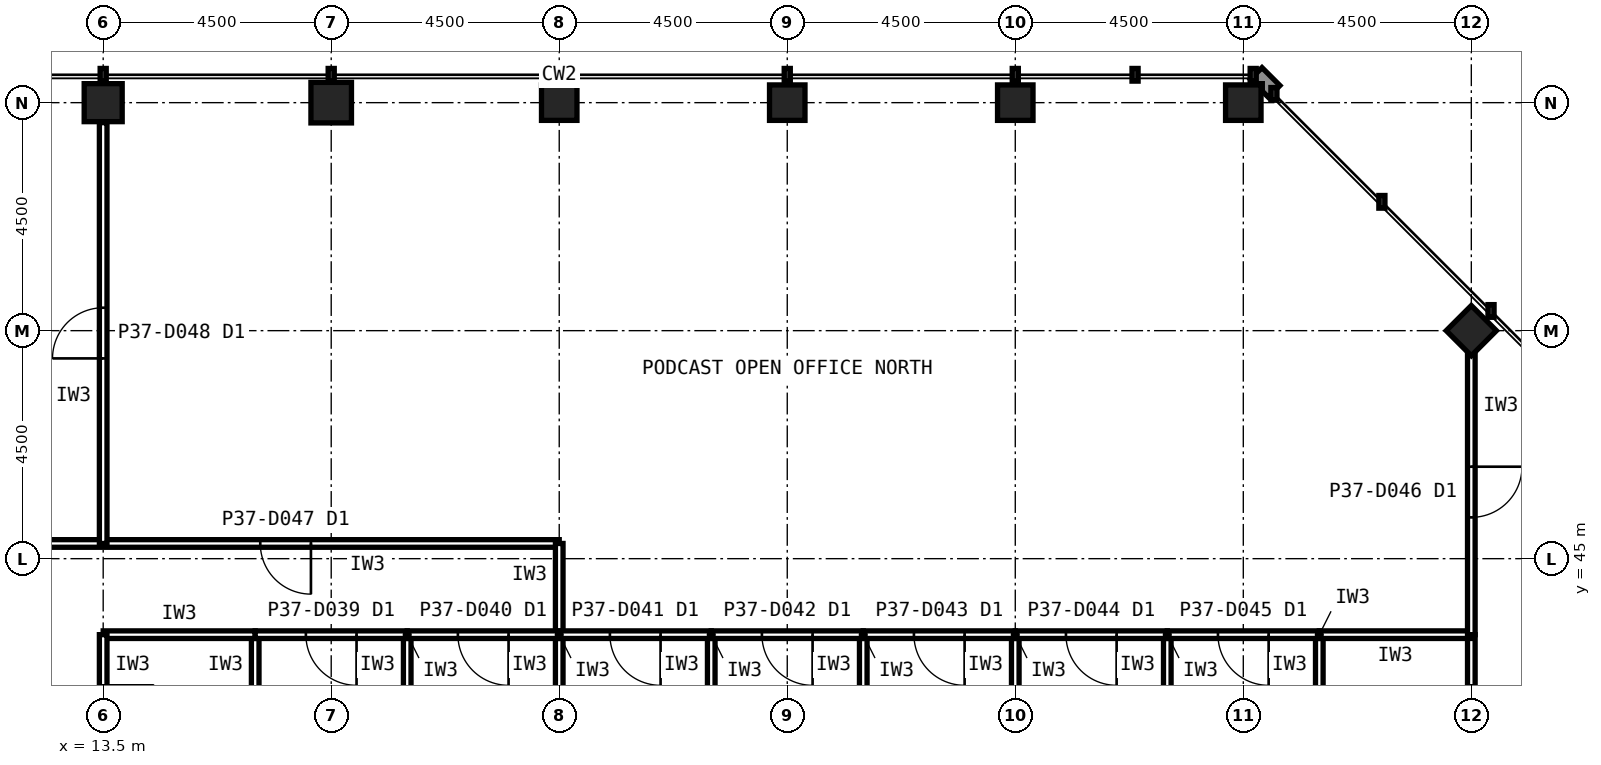
"""IFC4 building model, lengths in metres.
Left out: names, types, materials, properties, quantities, classifications, styles, units other than length and angle.
Written with IfcOpenShell. Run it as: python <this file> out.ifc"""

import sys

from ifc_helpers import new_model, si_unit, direction, frame, frame_2d, origin, origin_2d, place, context, subcontext, project, spatial, rectangle, hollow_rectangle, extrude, element, fill, save


model = new_model("IFC4")
c1 = context("Model", 3, precision=1e-05, world=origin(), true_north=direction((0.0, 1.0)))
c2 = subcontext(c1, "Body", "Model", "MODEL_VIEW")
j1 = project(units=[si_unit("LENGTHUNIT", "METRE"), si_unit("PLANEANGLEUNIT", "RADIAN")], contexts=[c1])
p1 = place(None, origin())
s1 = spatial("IfcSite", under=j1, at=p1, CompositionType="ELEMENT")
p2 = place(p1, origin())
s2 = spatial("IfcBuilding", under=s1, at=p2, CompositionType="ELEMENT")
p3 = place(p2, frame((0.0, 0.0, 159.6)))
s3 = spatial("IfcBuildingStorey", under=s2, at=p3, CompositionType="ELEMENT", Elevation=159.6)
for number, where, z_axis, x_axis in (
    (1, (36.0, 54.0, 0.0), (0.0, 0.0, 1.0), (1.0, 0.0, 0.0)),
    (2, (31.5, 54.0, 0.0), (0.0, 0.0, 1.0), (1.0, 0.0, 0.0)),
    (3, (27.0, 54.0, 0.0), (0.0, 0.0, 1.0), (1.0, 0.0, 0.0)),
    (4, (22.5, 54.0, 0.0), (0.0, 0.0, 1.0), (1.0, 0.0, 0.0)),
):
    element("IfcColumn", number, at=place(p3, frame(where, z_axis=z_axis, x_axis=x_axis)), inside=s3, PredefinedType="COLUMN", context=c2, shape_type="SweptSolid", body=[
        extrude(hollow_rectangle(XDim=0.7, YDim=0.7, WallThickness=0.036, at=origin_2d()), origin(), (0.0, 0.0, 1.0), 4.0),
    ])
p4 = place(p3, frame((18.0, 54.0, 0.0), z_axis=(0.0, 0.0, 1.0), x_axis=(1.0, 0.0, 0.0)))
e5 = element("IfcColumn", 5, at=p4, inside=s3, PredefinedType="COLUMN", context=c2, shape_type="SweptSolid", body=[
    extrude(hollow_rectangle(XDim=0.8, YDim=0.8, WallThickness=0.045, at=origin_2d()), origin(), (0.0, 0.0, 1.0), 4.0),
])
p5 = place(p3, frame((13.5, 54.0, 0.0), z_axis=(0.0, 0.0, 1.0), x_axis=(1.0, 0.0, 0.0)))
e6 = element("IfcColumn", 6, at=p5, inside=s3, PredefinedType="COLUMN", context=c2, shape_type="SweptSolid", body=[
    extrude(hollow_rectangle(XDim=0.75, YDim=0.75, WallThickness=0.04, at=origin_2d()), origin(), (0.0, 0.0, 1.0), 4.0),
])
p6 = place(p3, frame((40.5, 49.5, 0.0), z_axis=(0.0, 0.0, 1.0), x_axis=(0.707106781187, 0.707106781187, 0.0)))
e7 = element("IfcColumn", 7, at=p6, inside=s3, PredefinedType="COLUMN", context=c2, shape_type="SweptSolid", body=[
    extrude(hollow_rectangle(XDim=0.7, YDim=0.7, WallThickness=0.036, at=origin_2d()), origin(), (0.0, 0.0, 1.0), 4.0),
])
p7 = place(p3, frame((22.5, 45.3, 0.0), z_axis=(0.0, 0.0, 1.0), x_axis=(-1.0, 0.0, 0.0)))
e8 = element("IfcWall", 8, at=p7, inside=s3, PredefinedType="PARTITIONING", context=c2, shape_type="SweptSolid", body=[
    extrude(rectangle(XDim=10.8, YDim=0.15, at=frame_2d((5.4, 0.0))), origin(), (0.0, 0.0, 1.0), 3.84),
])
p8 = place(p7, frame((4.9, 0.0, 0.0)))
e9 = element("IfcOpeningElement", 9, at=p8, cuts=e8, PredefinedType="OPENING", context=c2, shape_type="SweptSolid", body=[
    extrude(rectangle(XDim=1.0, YDim=2.1, at=frame_2d((0.5, 1.05))), frame((0.0, 0.085, 0.0), z_axis=(0.0, -1.0, 0.0), x_axis=(1.0, 0.0, 0.0)), (0.0, 0.0, 1.0), 0.17),
])
p9 = place(p3, frame((22.5, 43.5, 0.0), z_axis=(0.0, 0.0, 1.0), x_axis=(0.0, 1.0, 0.0)))
e10 = element("IfcWall", 10, at=p9, inside=s3, PredefinedType="PARTITIONING", context=c2, shape_type="SweptSolid", body=[
    extrude(rectangle(XDim=1.8, YDim=0.15, at=frame_2d((0.9, 0.0))), origin(), (0.0, 0.0, 1.0), 2.989),
])
for number, where, z_axis, x_axis in (
    (11, (16.5, 40.5, 0.0), (0.0, 0.0, 1.0), (0.0, 1.0, 0.0)),
    (12, (16.5, 43.5, 0.0), (0.0, 0.0, 1.0), (-1.0, 0.0, 0.0)),
):
    element("IfcWall", number, at=place(p3, frame(where, z_axis=z_axis, x_axis=x_axis)), inside=s3, PredefinedType="PARTITIONING", context=c2, shape_type="SweptSolid", body=[
        extrude(rectangle(XDim=3.0, YDim=0.15, at=frame_2d((1.5, 0.0))), origin(), (0.0, 0.0, 1.0), 3.84),
    ])
p10 = place(p3, frame((13.5, 43.5, 0.0), z_axis=(0.0, 0.0, 1.0), x_axis=(0.0, -1.0, 0.0)))
e13 = element("IfcWall", 13, at=p10, inside=s3, PredefinedType="PARTITIONING", context=c2, shape_type="SweptSolid", body=[
    extrude(rectangle(XDim=3.0, YDim=0.15, at=frame_2d((1.5, 0.0))), origin(), (0.0, 0.0, 1.0), 2.989),
])
p11 = place(p10, frame((1.0, 0.0, 0.0)))
e14 = element("IfcOpeningElement", 14, at=p11, cuts=e13, PredefinedType="OPENING", context=c2, shape_type="SweptSolid", body=[
    extrude(rectangle(XDim=1.0, YDim=2.1, at=frame_2d((0.5, 1.05))), frame((0.0, 0.085, 0.0), z_axis=(0.0, -1.0, 0.0), x_axis=(1.0, 0.0, 0.0)), (0.0, 0.0, 1.0), 0.17),
])
p12 = place(p3, frame((19.5, 40.5, 0.0), z_axis=(0.0, 0.0, 1.0), x_axis=(0.0, 1.0, 0.0)))
e15 = element("IfcWall", 15, at=p12, inside=s3, PredefinedType="PARTITIONING", context=c2, shape_type="SweptSolid", body=[
    extrude(rectangle(XDim=3.0, YDim=0.15, at=frame_2d((1.5, 0.0))), origin(), (0.0, 0.0, 1.0), 3.84),
])
p13 = place(p3, frame((19.5, 43.5, 0.0), z_axis=(0.0, 0.0, 1.0), x_axis=(-1.0, 0.0, 0.0)))
e16 = element("IfcWall", 16, at=p13, inside=s3, PredefinedType="PARTITIONING", context=c2, shape_type="SweptSolid", body=[
    extrude(rectangle(XDim=3.0, YDim=0.15, at=frame_2d((1.5, 0.0))), origin(), (0.0, 0.0, 1.0), 3.84),
])
p14 = place(p13, frame((1.0, 0.0, 0.0)))
e17 = element("IfcOpeningElement", 17, at=p14, cuts=e16, PredefinedType="OPENING", context=c2, shape_type="SweptSolid", body=[
    extrude(rectangle(XDim=1.0, YDim=2.1, at=frame_2d((0.5, 1.05))), frame((0.0, 0.085, 0.0), z_axis=(0.0, -1.0, 0.0), x_axis=(1.0, 0.0, 0.0)), (0.0, 0.0, 1.0), 0.17),
])
p15 = place(p3, frame((22.5, 40.5, 0.0), z_axis=(0.0, 0.0, 1.0), x_axis=(0.0, 1.0, 0.0)))
e18 = element("IfcWall", 18, at=p15, inside=s3, PredefinedType="PARTITIONING", context=c2, shape_type="SweptSolid", body=[
    extrude(rectangle(XDim=3.0, YDim=0.15, at=frame_2d((1.5, 0.0))), origin(), (0.0, 0.0, 1.0), 2.989),
])
p16 = place(p3, frame((22.5, 43.5, 0.0), z_axis=(0.0, 0.0, 1.0), x_axis=(-1.0, 0.0, 0.0)))
e19 = element("IfcWall", 19, at=p16, inside=s3, PredefinedType="PARTITIONING", context=c2, shape_type="SweptSolid", body=[
    extrude(rectangle(XDim=3.0, YDim=0.15, at=frame_2d((1.5, 0.0))), origin(), (0.0, 0.0, 1.0), 3.84),
])
p17 = place(p16, frame((1.0, 0.0, 0.0)))
e20 = element("IfcOpeningElement", 20, at=p17, cuts=e19, PredefinedType="OPENING", context=c2, shape_type="SweptSolid", body=[
    extrude(rectangle(XDim=1.0, YDim=2.1, at=frame_2d((0.5, 1.05))), frame((0.0, 0.085, 0.0), z_axis=(0.0, -1.0, 0.0), x_axis=(1.0, 0.0, 0.0)), (0.0, 0.0, 1.0), 0.17),
])
p18 = place(p3, frame((25.5, 40.5, 0.0), z_axis=(0.0, 0.0, 1.0), x_axis=(0.0, 1.0, 0.0)))
e21 = element("IfcWall", 21, at=p18, inside=s3, PredefinedType="PARTITIONING", context=c2, shape_type="SweptSolid", body=[
    extrude(rectangle(XDim=3.0, YDim=0.15, at=frame_2d((1.5, 0.0))), origin(), (0.0, 0.0, 1.0), 3.84),
])
p19 = place(p3, frame((25.5, 43.5, 0.0), z_axis=(0.0, 0.0, 1.0), x_axis=(-1.0, 0.0, 0.0)))
e22 = element("IfcWall", 22, at=p19, inside=s3, PredefinedType="PARTITIONING", context=c2, shape_type="SweptSolid", body=[
    extrude(rectangle(XDim=3.0, YDim=0.15, at=frame_2d((1.5, 0.0))), origin(), (0.0, 0.0, 1.0), 3.84),
])
p20 = place(p19, frame((1.0, 0.0, 0.0)))
e23 = element("IfcOpeningElement", 23, at=p20, cuts=e22, PredefinedType="OPENING", context=c2, shape_type="SweptSolid", body=[
    extrude(rectangle(XDim=1.0, YDim=2.1, at=frame_2d((0.5, 1.05))), frame((0.0, 0.085, 0.0), z_axis=(0.0, -1.0, 0.0), x_axis=(1.0, 0.0, 0.0)), (0.0, 0.0, 1.0), 0.17),
])
p21 = place(p3, frame((28.5, 40.5, 0.0), z_axis=(0.0, 0.0, 1.0), x_axis=(0.0, 1.0, 0.0)))
e24 = element("IfcWall", 24, at=p21, inside=s3, PredefinedType="PARTITIONING", context=c2, shape_type="SweptSolid", body=[
    extrude(rectangle(XDim=3.0, YDim=0.15, at=frame_2d((1.5, 0.0))), origin(), (0.0, 0.0, 1.0), 3.84),
])
p22 = place(p3, frame((28.5, 43.5, 0.0), z_axis=(0.0, 0.0, 1.0), x_axis=(-1.0, 0.0, 0.0)))
e25 = element("IfcWall", 25, at=p22, inside=s3, PredefinedType="PARTITIONING", context=c2, shape_type="SweptSolid", body=[
    extrude(rectangle(XDim=3.0, YDim=0.15, at=frame_2d((1.5, 0.0))), origin(), (0.0, 0.0, 1.0), 3.84),
])
p23 = place(p22, frame((1.0, 0.0, 0.0)))
e26 = element("IfcOpeningElement", 26, at=p23, cuts=e25, PredefinedType="OPENING", context=c2, shape_type="SweptSolid", body=[
    extrude(rectangle(XDim=1.0, YDim=2.1, at=frame_2d((0.5, 1.05))), frame((0.0, 0.085, 0.0), z_axis=(0.0, -1.0, 0.0), x_axis=(1.0, 0.0, 0.0)), (0.0, 0.0, 1.0), 0.17),
])
p24 = place(p3, frame((31.5, 40.5, 0.0), z_axis=(0.0, 0.0, 1.0), x_axis=(0.0, 1.0, 0.0)))
e27 = element("IfcWall", 27, at=p24, inside=s3, PredefinedType="PARTITIONING", context=c2, shape_type="SweptSolid", body=[
    extrude(rectangle(XDim=3.0, YDim=0.15, at=frame_2d((1.5, 0.0))), origin(), (0.0, 0.0, 1.0), 2.989),
])
p25 = place(p3, frame((31.5, 43.5, 0.0), z_axis=(0.0, 0.0, 1.0), x_axis=(-1.0, 0.0, 0.0)))
e28 = element("IfcWall", 28, at=p25, inside=s3, PredefinedType="PARTITIONING", context=c2, shape_type="SweptSolid", body=[
    extrude(rectangle(XDim=3.0, YDim=0.15, at=frame_2d((1.5, 0.0))), origin(), (0.0, 0.0, 1.0), 3.84),
])
p26 = place(p25, frame((1.0, 0.0, 0.0)))
e29 = element("IfcOpeningElement", 29, at=p26, cuts=e28, PredefinedType="OPENING", context=c2, shape_type="SweptSolid", body=[
    extrude(rectangle(XDim=1.0, YDim=2.1, at=frame_2d((0.5, 1.05))), frame((0.0, 0.085, 0.0), z_axis=(0.0, -1.0, 0.0), x_axis=(1.0, 0.0, 0.0)), (0.0, 0.0, 1.0), 0.17),
])
p27 = place(p3, frame((34.5, 40.5, 0.0), z_axis=(0.0, 0.0, 1.0), x_axis=(0.0, 1.0, 0.0)))
e30 = element("IfcWall", 30, at=p27, inside=s3, PredefinedType="PARTITIONING", context=c2, shape_type="SweptSolid", body=[
    extrude(rectangle(XDim=3.0, YDim=0.15, at=frame_2d((1.5, 0.0))), origin(), (0.0, 0.0, 1.0), 3.84),
])
p28 = place(p3, frame((34.5, 43.5, 0.0), z_axis=(0.0, 0.0, 1.0), x_axis=(-1.0, 0.0, 0.0)))
e31 = element("IfcWall", 31, at=p28, inside=s3, PredefinedType="PARTITIONING", context=c2, shape_type="SweptSolid", body=[
    extrude(rectangle(XDim=3.0, YDim=0.15, at=frame_2d((1.5, 0.0))), origin(), (0.0, 0.0, 1.0), 3.84),
])
p29 = place(p28, frame((1.0, 0.0, 0.0)))
e32 = element("IfcOpeningElement", 32, at=p29, cuts=e31, PredefinedType="OPENING", context=c2, shape_type="SweptSolid", body=[
    extrude(rectangle(XDim=1.0, YDim=2.1, at=frame_2d((0.5, 1.05))), frame((0.0, 0.085, 0.0), z_axis=(0.0, -1.0, 0.0), x_axis=(1.0, 0.0, 0.0)), (0.0, 0.0, 1.0), 0.17),
])
p30 = place(p3, frame((37.5, 40.5, 0.0), z_axis=(0.0, 0.0, 1.0), x_axis=(0.0, 1.0, 0.0)))
e33 = element("IfcWall", 33, at=p30, inside=s3, PredefinedType="PARTITIONING", context=c2, shape_type="SweptSolid", body=[
    extrude(rectangle(XDim=3.0, YDim=0.15, at=frame_2d((1.5, 0.0))), origin(), (0.0, 0.0, 1.0), 3.84),
])
p31 = place(p3, frame((37.5, 43.5, 0.0), z_axis=(0.0, 0.0, 1.0), x_axis=(-1.0, 0.0, 0.0)))
e34 = element("IfcWall", 34, at=p31, inside=s3, PredefinedType="PARTITIONING", context=c2, shape_type="SweptSolid", body=[
    extrude(rectangle(XDim=3.0, YDim=0.15, at=frame_2d((1.5, 0.0))), origin(), (0.0, 0.0, 1.0), 3.84),
])
p32 = place(p31, frame((1.0, 0.0, 0.0)))
e35 = element("IfcOpeningElement", 35, at=p32, cuts=e34, PredefinedType="OPENING", context=c2, shape_type="SweptSolid", body=[
    extrude(rectangle(XDim=1.0, YDim=2.1, at=frame_2d((0.5, 1.05))), frame((0.0, 0.085, 0.0), z_axis=(0.0, -1.0, 0.0), x_axis=(1.0, 0.0, 0.0)), (0.0, 0.0, 1.0), 0.17),
])
p33 = place(p3, frame((40.5, 40.5, 0.0), z_axis=(0.0, 0.0, 1.0), x_axis=(0.0, 1.0, 0.0)))
e36 = element("IfcWall", 36, at=p33, inside=s3, PredefinedType="PARTITIONING", context=c2, shape_type="SweptSolid", body=[
    extrude(rectangle(XDim=3.0, YDim=0.15, at=frame_2d((1.5, 0.0))), origin(), (0.0, 0.0, 1.0), 2.989),
])
p34 = place(p33, frame((1.0, 0.0, 0.0)))
e37 = element("IfcOpeningElement", 37, at=p34, cuts=e36, PredefinedType="OPENING", context=c2, shape_type="SweptSolid", body=[
    extrude(rectangle(XDim=1.0, YDim=2.1, at=frame_2d((0.5, 1.05))), frame((0.0, 0.085, 0.0), z_axis=(0.0, -1.0, 0.0), x_axis=(1.0, 0.0, 0.0)), (0.0, 0.0, 1.0), 0.17),
])
p35 = place(p3, frame((40.5, 43.5, 0.0), z_axis=(0.0, 0.0, 1.0), x_axis=(-1.0, 0.0, 0.0)))
e38 = element("IfcWall", 38, at=p35, inside=s3, PredefinedType="PARTITIONING", context=c2, shape_type="SweptSolid", body=[
    extrude(rectangle(XDim=3.0, YDim=0.15, at=frame_2d((1.5, 0.0))), origin(), (0.0, 0.0, 1.0), 3.84),
])
p36 = place(p3, frame((40.5, 49.13, 0.0), z_axis=(0.0, 0.0, 1.0), x_axis=(0.0, -1.0, 0.0)))
e39 = element("IfcWall", 39, at=p36, inside=s3, PredefinedType="PARTITIONING", context=c2, shape_type="SweptSolid", body=[
    extrude(rectangle(XDim=5.63, YDim=0.15, at=frame_2d((2.815, 0.0))), origin(), (0.0, 0.0, 1.0), 2.989),
])
p37 = place(p36, frame((2.315, 0.0, 0.0)))
e40 = element("IfcOpeningElement", 40, at=p37, cuts=e39, PredefinedType="OPENING", context=c2, shape_type="SweptSolid", body=[
    extrude(rectangle(XDim=1.0, YDim=2.1, at=frame_2d((0.5, 1.05))), frame((0.0, 0.085, 0.0), z_axis=(0.0, -1.0, 0.0), x_axis=(1.0, 0.0, 0.0)), (0.0, 0.0, 1.0), 0.17),
])
p38 = place(p3, frame((13.5, 45.3, 0.0), z_axis=(0.0, 0.0, 1.0), x_axis=(0.0, 1.0, 0.0)))
e41 = element("IfcWall", 41, at=p38, inside=s3, PredefinedType="PARTITIONING", context=c2, shape_type="SweptSolid", body=[
    extrude(rectangle(XDim=8.305, YDim=0.15, at=frame_2d((4.152, 0.0))), origin(), (0.0, 0.0, 1.0), 2.989),
])
p39 = place(p38, frame((3.653, 0.0, 0.0)))
e42 = element("IfcOpeningElement", 42, at=p39, cuts=e41, PredefinedType="OPENING", context=c2, shape_type="SweptSolid", body=[
    extrude(rectangle(XDim=1.0, YDim=2.1, at=frame_2d((0.5, 1.05))), frame((0.0, 0.085, 0.0), z_axis=(0.0, -1.0, 0.0), x_axis=(1.0, 0.0, 0.0)), (0.0, 0.0, 1.0), 0.17),
])
p40 = place(p8, origin())
e43 = element("IfcDoor", 43, at=p40, inside=s3, OperationType="SINGLE_SWING_LEFT", PredefinedType="DOOR", context=c2, shape_type="SweptSolid", body=[
    extrude(rectangle(XDim=1.0, YDim=2.1, at=frame_2d((0.5, 1.05))), frame((0.0, 0.025, 0.0), z_axis=(0.0, -1.0, 0.0), x_axis=(1.0, 0.0, 0.0)), (0.0, 0.0, 1.0), 0.05),
])
fill(e9, e43)
p41 = place(p14, origin())
e44 = element("IfcDoor", 44, at=p41, inside=s3, OperationType="SINGLE_SWING_LEFT", PredefinedType="DOOR", context=c2, shape_type="SweptSolid", body=[
    extrude(rectangle(XDim=1.0, YDim=2.1, at=frame_2d((0.5, 1.05))), frame((0.0, 0.025, 0.0), z_axis=(0.0, -1.0, 0.0), x_axis=(1.0, 0.0, 0.0)), (0.0, 0.0, 1.0), 0.05),
])
fill(e17, e44)
p42 = place(p17, origin())
e45 = element("IfcDoor", 45, at=p42, inside=s3, OperationType="SINGLE_SWING_LEFT", PredefinedType="DOOR", context=c2, shape_type="SweptSolid", body=[
    extrude(rectangle(XDim=1.0, YDim=2.1, at=frame_2d((0.5, 1.05))), frame((0.0, 0.025, 0.0), z_axis=(0.0, -1.0, 0.0), x_axis=(1.0, 0.0, 0.0)), (0.0, 0.0, 1.0), 0.05),
])
fill(e20, e45)
p43 = place(p20, origin())
e46 = element("IfcDoor", 46, at=p43, inside=s3, OperationType="SINGLE_SWING_LEFT", PredefinedType="DOOR", context=c2, shape_type="SweptSolid", body=[
    extrude(rectangle(XDim=1.0, YDim=2.1, at=frame_2d((0.5, 1.05))), frame((0.0, 0.025, 0.0), z_axis=(0.0, -1.0, 0.0), x_axis=(1.0, 0.0, 0.0)), (0.0, 0.0, 1.0), 0.05),
])
fill(e23, e46)
p44 = place(p23, origin())
e47 = element("IfcDoor", 47, at=p44, inside=s3, OperationType="SINGLE_SWING_LEFT", PredefinedType="DOOR", context=c2, shape_type="SweptSolid", body=[
    extrude(rectangle(XDim=1.0, YDim=2.1, at=frame_2d((0.5, 1.05))), frame((0.0, 0.025, 0.0), z_axis=(0.0, -1.0, 0.0), x_axis=(1.0, 0.0, 0.0)), (0.0, 0.0, 1.0), 0.05),
])
fill(e26, e47)
p45 = place(p26, origin())
e48 = element("IfcDoor", 48, at=p45, inside=s3, OperationType="SINGLE_SWING_LEFT", PredefinedType="DOOR", context=c2, shape_type="SweptSolid", body=[
    extrude(rectangle(XDim=1.0, YDim=2.1, at=frame_2d((0.5, 1.05))), frame((0.0, 0.025, 0.0), z_axis=(0.0, -1.0, 0.0), x_axis=(1.0, 0.0, 0.0)), (0.0, 0.0, 1.0), 0.05),
])
fill(e29, e48)
p46 = place(p29, origin())
e49 = element("IfcDoor", 49, at=p46, inside=s3, OperationType="SINGLE_SWING_LEFT", PredefinedType="DOOR", context=c2, shape_type="SweptSolid", body=[
    extrude(rectangle(XDim=1.0, YDim=2.1, at=frame_2d((0.5, 1.05))), frame((0.0, 0.025, 0.0), z_axis=(0.0, -1.0, 0.0), x_axis=(1.0, 0.0, 0.0)), (0.0, 0.0, 1.0), 0.05),
])
fill(e32, e49)
p47 = place(p32, origin())
e50 = element("IfcDoor", 50, at=p47, inside=s3, OperationType="SINGLE_SWING_LEFT", PredefinedType="DOOR", context=c2, shape_type="SweptSolid", body=[
    extrude(rectangle(XDim=1.0, YDim=2.1, at=frame_2d((0.5, 1.05))), frame((0.0, 0.025, 0.0), z_axis=(0.0, -1.0, 0.0), x_axis=(1.0, 0.0, 0.0)), (0.0, 0.0, 1.0), 0.05),
])
fill(e35, e50)
p48 = place(p37, origin())
e51 = element("IfcDoor", 51, at=p48, inside=s3, OperationType="SINGLE_SWING_LEFT", PredefinedType="DOOR", context=c2, shape_type="SweptSolid", body=[
    extrude(rectangle(XDim=1.0, YDim=2.1, at=frame_2d((0.5, 1.05))), frame((0.0, 0.025, 0.0), z_axis=(0.0, -1.0, 0.0), x_axis=(1.0, 0.0, 0.0)), (0.0, 0.0, 1.0), 0.05),
])
fill(e40, e51)
p49 = place(p39, origin())
e52 = element("IfcDoor", 52, at=p49, inside=s3, OperationType="SINGLE_SWING_LEFT", PredefinedType="DOOR", context=c2, shape_type="SweptSolid", body=[
    extrude(rectangle(XDim=1.0, YDim=2.1, at=frame_2d((0.5, 1.05))), frame((0.0, 0.025, 0.0), z_axis=(0.0, -1.0, 0.0), x_axis=(1.0, 0.0, 0.0)), (0.0, 0.0, 1.0), 0.05),
])
fill(e42, e52)
save(model, sys.argv[1])
